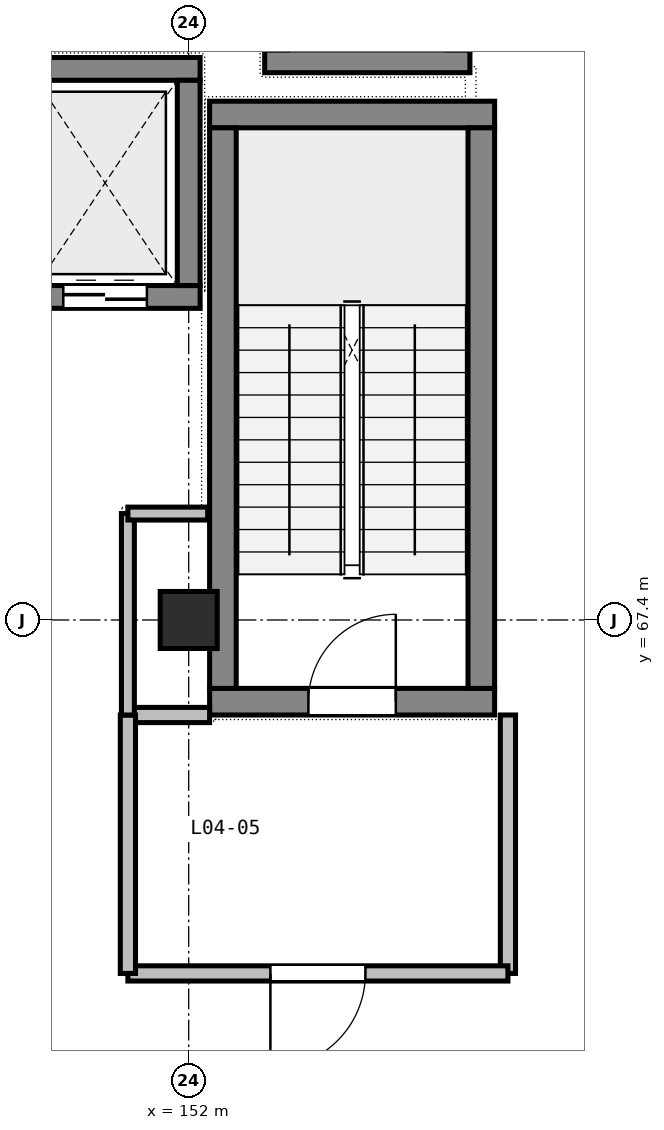
"""IFC4 building model, lengths in metres.
Left out: names, types, materials, properties, quantities, classifications, styles, units other than length and angle.
Written with IfcOpenShell. Run it as: python <this file> out.ifc"""

import sys

from ifc_helpers import new_model, si_unit, direction, frame, frame_2d, origin, origin_2d, place, context, subcontext, project, spatial, rectangle, extrude, element, fill, save


model = new_model("IFC4")
c1 = context("Model", 3, precision=1e-05, world=origin(), true_north=direction((0.0, 1.0)))
c2 = subcontext(c1, "Body", "Model", "MODEL_VIEW")
j1 = project(units=[si_unit("LENGTHUNIT", "METRE"), si_unit("PLANEANGLEUNIT", "RADIAN")], contexts=[c1])
p1 = place(None, origin())
s1 = spatial("IfcSite", under=j1, at=p1, CompositionType="ELEMENT")
p2 = place(p1, origin())
s2 = spatial("IfcBuilding", under=s1, at=p2, CompositionType="ELEMENT")
p3 = place(p2, frame((0.0, 0.0, 19.5)))
s3 = spatial("IfcBuildingStorey", under=s2, at=p3, CompositionType="ELEMENT", Elevation=19.5)
p4 = place(p3, frame((152.0, 67.4, 0.0), z_axis=(0.0, 0.0, 1.0), x_axis=(1.0, 0.0, 0.0)))
e1 = element("IfcColumn", 1, at=p4, inside=s3, PredefinedType="COLUMN", context=c2, shape_type="SweptSolid", body=[
    extrude(rectangle(XDim=0.75, YDim=0.75, at=origin_2d()), origin(), (0.0, 0.0, 1.0), 4.5),
])
p5 = place(p3, frame((152.275, 66.325, 0.0), z_axis=(0.0, 0.0, 1.0), x_axis=(1.0, 0.0, 0.0)))
e2 = element("IfcWall", 2, at=p5, inside=s3, PredefinedType="SHEAR", context=c2, shape_type="SweptSolid", body=[
    extrude(rectangle(XDim=3.75, YDim=0.35, at=frame_2d((1.875, 0.0))), origin(), (0.0, 0.0, 1.0), 4.5),
])
p6 = place(p5, frame((1.3, 0.0, 0.0)))
e3 = element("IfcOpeningElement", 3, at=p6, cuts=e2, PredefinedType="OPENING", context=c2, shape_type="SweptSolid", body=[
    extrude(rectangle(XDim=1.15, YDim=2.15, at=frame_2d((0.575, 1.075))), frame((0.0, 0.185, 0.0), z_axis=(0.0, -1.0, 0.0), x_axis=(1.0, 0.0, 0.0)), (0.0, 0.0, 1.0), 0.37),
])
p7 = place(p3, frame((152.275, 74.05, 0.0), z_axis=(0.0, 0.0, 1.0), x_axis=(1.0, 0.0, 0.0)))
e4 = element("IfcWall", 4, at=p7, inside=s3, PredefinedType="SHEAR", context=c2, shape_type="SweptSolid", body=[
    extrude(rectangle(XDim=3.75, YDim=0.35, at=frame_2d((1.875, 0.0))), origin(), (0.0, 0.0, 1.0), 4.5),
])
for number, where, z_axis, x_axis in (
    (5, (152.45, 66.5, 0.0), (0.0, 0.0, 1.0), (0.0, 1.0, 0.0)),
    (6, (155.85, 66.5, 0.0), (0.0, 0.0, 1.0), (0.0, 1.0, 0.0)),
):
    element("IfcWall", number, at=place(p3, frame(where, z_axis=z_axis, x_axis=x_axis)), inside=s3, PredefinedType="SHEAR", context=c2, shape_type="SweptSolid", body=[
        extrude(rectangle(XDim=7.375, YDim=0.35, at=frame_2d((3.688, 0.0))), origin(), (0.0, 0.0, 1.0), 4.5),
    ])
p8 = place(p3, frame((149.65, 71.65, 0.0), z_axis=(0.0, 0.0, 1.0), x_axis=(1.0, 0.0, 0.0)))
e7 = element("IfcWall", 7, at=p8, inside=s3, PredefinedType="SHEAR", context=c2, shape_type="SweptSolid", body=[
    extrude(rectangle(XDim=2.5, YDim=0.3, at=frame_2d((1.25, 0.0))), origin(), (0.0, 0.0, 1.0), 4.5),
])
p9 = place(p8, frame((0.7, 0.0, 0.0)))
e8 = element("IfcOpeningElement", 8, at=p9, cuts=e7, PredefinedType="OPENING", context=c2, shape_type="SweptSolid", body=[
    extrude(rectangle(XDim=1.1, YDim=2.1, at=frame_2d((0.55, 1.05))), frame((0.0, 0.16, 0.0), z_axis=(0.0, -1.0, 0.0), x_axis=(1.0, 0.0, 0.0)), (0.0, 0.0, 1.0), 0.32),
])
p10 = place(p3, frame((149.65, 74.65, 0.0), z_axis=(0.0, 0.0, 1.0), x_axis=(1.0, 0.0, 0.0)))
e9 = element("IfcWall", 9, at=p10, inside=s3, PredefinedType="SHEAR", context=c2, shape_type="SweptSolid", body=[
    extrude(rectangle(XDim=2.5, YDim=0.3, at=frame_2d((1.25, 0.0))), origin(), (0.0, 0.0, 1.0), 4.5),
])
for number, where, z_axis, x_axis in (
    (10, (152.0, 71.8, 0.0), (0.0, 0.0, 1.0), (0.0, 1.0, 0.0)),
    (11, (153.0, 74.75, 0.0), (0.0, 0.0, 1.0), (1.0, 0.0, 0.0)),
):
    element("IfcWall", number, at=place(p3, frame(where, z_axis=z_axis, x_axis=x_axis)), inside=s3, PredefinedType="SHEAR", context=c2, shape_type="SweptSolid", body=[
        extrude(rectangle(XDim=2.7, YDim=0.3, at=frame_2d((1.35, 0.0))), origin(), (0.0, 0.0, 1.0), 4.5),
    ])
p11 = place(p3, frame((151.2, 66.15, 0.0), z_axis=(0.0, 0.0, 1.0), x_axis=(1.0, 0.0, 0.0)))
e12 = element("IfcWall", 12, at=p11, inside=s3, PredefinedType="PARTITIONING", context=c2, shape_type="SweptSolid", body=[
    extrude(rectangle(XDim=1.075, YDim=0.2, at=frame_2d((0.538, 0.0))), origin(), (0.0, 0.0, 1.0), 3.735),
])
p12 = place(p3, frame((156.2, 66.15, 0.0), z_axis=(0.0, 0.0, 1.0), x_axis=(0.0, -1.0, 0.0)))
e13 = element("IfcWall", 13, at=p12, inside=s3, PredefinedType="PARTITIONING", context=c2, shape_type="SweptSolid", body=[
    extrude(rectangle(XDim=3.4, YDim=0.2, at=frame_2d((1.7, 0.0))), origin(), (0.0, 0.0, 1.0), 4.195),
])
p13 = place(p3, frame((156.2, 62.75, 0.0), z_axis=(0.0, 0.0, 1.0), x_axis=(-1.0, 0.0, 0.0)))
e14 = element("IfcWall", 14, at=p13, inside=s3, PredefinedType="PARTITIONING", context=c2, shape_type="SweptSolid", body=[
    extrude(rectangle(XDim=5.0, YDim=0.2, at=frame_2d((2.5, 0.0))), origin(), (0.0, 0.0, 1.0), 3.735),
])
p14 = place(p13, frame((1.875, 0.0, 0.0)))
e15 = element("IfcOpeningElement", 15, at=p14, cuts=e14, PredefinedType="OPENING", context=c2, shape_type="SweptSolid", body=[
    extrude(rectangle(XDim=1.25, YDim=2.15, at=frame_2d((0.625, 1.075))), frame((0.0, 0.11, 0.0), z_axis=(0.0, -1.0, 0.0), x_axis=(1.0, 0.0, 0.0)), (0.0, 0.0, 1.0), 0.22),
])
p15 = place(p3, frame((151.2, 62.75, 0.0), z_axis=(0.0, 0.0, 1.0), x_axis=(0.0, 1.0, 0.0)))
e16 = element("IfcWall", 16, at=p15, inside=s3, PredefinedType="PARTITIONING", context=c2, shape_type="SweptSolid", body=[
    extrude(rectangle(XDim=3.4, YDim=0.2, at=frame_2d((1.7, 0.0))), origin(), (0.0, 0.0, 1.0), 4.195),
])
p16 = place(p3, frame((151.2, 66.15, 0.0), z_axis=(0.0, 0.0, 1.0), x_axis=(0.0, 1.0, 0.0)))
e17 = element("IfcWall", 17, at=p16, inside=s3, PredefinedType="PARTITIONING", context=c2, shape_type="SweptSolid", body=[
    extrude(rectangle(XDim=2.65, YDim=0.17, at=frame_2d((1.325, 0.0))), origin(), (0.0, 0.0, 1.0), 3.885),
])
p17 = place(p3, frame((151.2, 68.8, 0.0), z_axis=(0.0, 0.0, 1.0), x_axis=(1.0, 0.0, 0.0)))
e18 = element("IfcWall", 18, at=p17, inside=s3, PredefinedType="PARTITIONING", context=c2, shape_type="SweptSolid", body=[
    extrude(rectangle(XDim=1.05, YDim=0.17, at=frame_2d((0.525, 0.0))), origin(), (0.0, 0.0, 1.0), 3.735),
])
p18 = place(p6, origin())
e19 = element("IfcDoor", 19, at=p18, inside=s3, OperationType="SINGLE_SWING_RIGHT", PredefinedType="DOOR", context=c2, shape_type="SweptSolid", body=[
    extrude(rectangle(XDim=1.15, YDim=2.15, at=frame_2d((0.575, 1.075))), frame((0.0, 0.025, 0.0), z_axis=(0.0, -1.0, 0.0), x_axis=(1.0, 0.0, 0.0)), (0.0, 0.0, 1.0), 0.05),
])
fill(e3, e19)
p19 = place(p9, origin())
e20 = element("IfcDoor", 20, at=p19, inside=s3, OperationType="DOUBLE_DOOR_SLIDING", PredefinedType="DOOR", context=c2, shape_type="SweptSolid", body=[
    extrude(rectangle(XDim=1.1, YDim=2.1, at=frame_2d((0.55, 1.05))), frame((0.0, 0.025, 0.0), z_axis=(0.0, -1.0, 0.0), x_axis=(1.0, 0.0, 0.0)), (0.0, 0.0, 1.0), 0.05),
])
fill(e8, e20)
p20 = place(p14, origin())
e21 = element("IfcDoor", 21, at=p20, inside=s3, OperationType="SINGLE_SWING_RIGHT", PredefinedType="DOOR", context=c2, shape_type="SweptSolid", body=[
    extrude(rectangle(XDim=1.25, YDim=2.15, at=frame_2d((0.625, 1.075))), frame((0.0, 0.025, 0.0), z_axis=(0.0, -1.0, 0.0), x_axis=(1.0, 0.0, 0.0)), (0.0, 0.0, 1.0), 0.05),
])
fill(e15, e21)
save(model, sys.argv[1])
